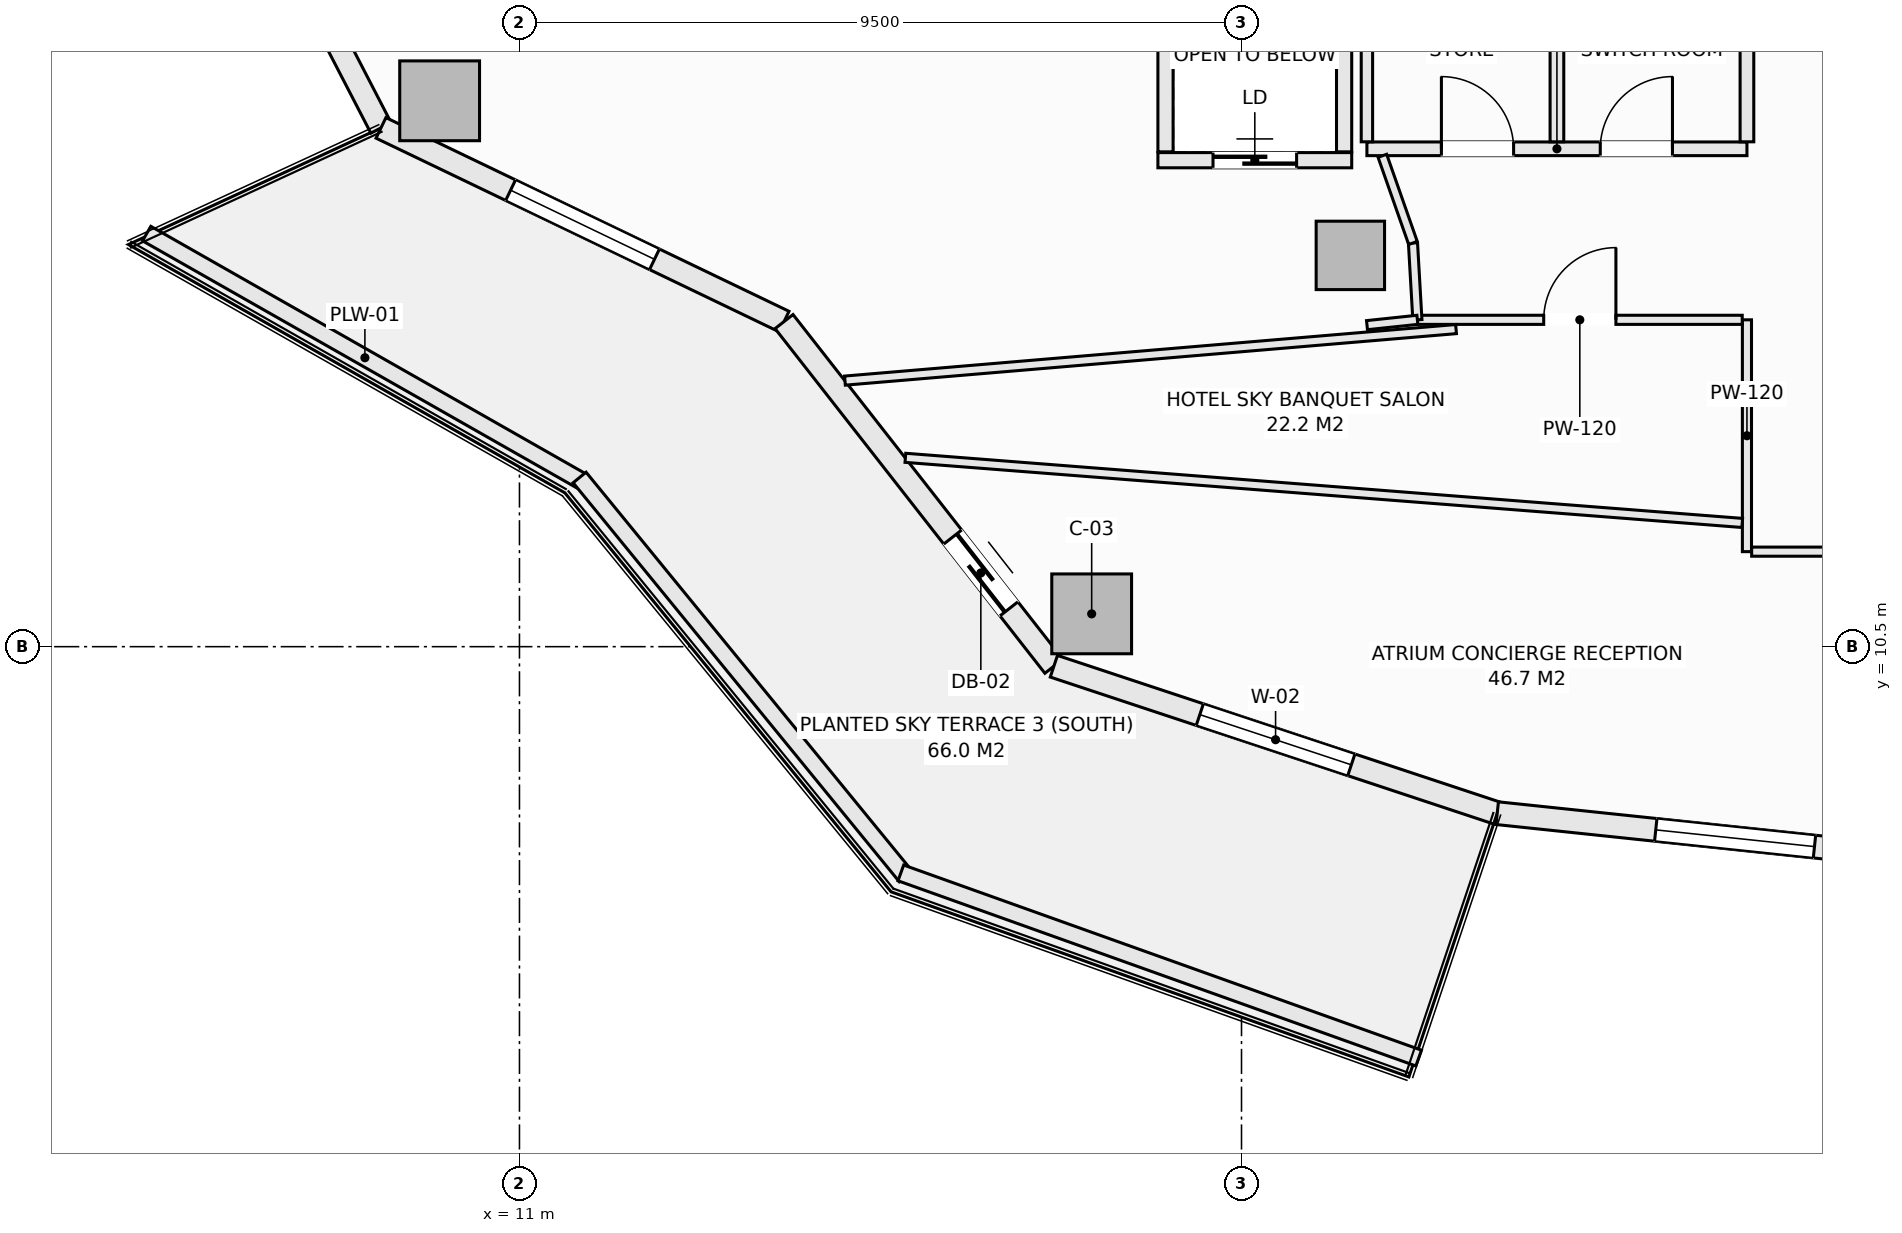
"""IFC4 building model, lengths in metres.
Left out: names, types, materials, properties, quantities, classifications, styles, units other than length and angle.
Written with IfcOpenShell. Run it as: python <this file> out.ifc"""

import sys

from ifc_helpers import new_model, si_unit, direction, frame, frame_2d, origin, origin_2d, place, context, subcontext, project, spatial, rectangle, extrude, element, fill, save


model = new_model("IFC4")
c1 = context("Model", 3, precision=1e-05, world=origin(), true_north=direction((0.0, 1.0)))
c2 = subcontext(c1, "Body", "Model", "MODEL_VIEW")
j1 = project(units=[si_unit("LENGTHUNIT", "METRE"), si_unit("PLANEANGLEUNIT", "RADIAN")], contexts=[c1])
p1 = place(None, origin())
s1 = spatial("IfcSite", under=j1, at=p1, CompositionType="ELEMENT")
p2 = place(p1, origin())
s2 = spatial("IfcBuilding", under=s1, at=p2, CompositionType="ELEMENT")
p3 = place(p2, frame((0.0, 0.0, 139.3)))
s3 = spatial("IfcBuildingStorey", under=s2, at=p3, CompositionType="ELEMENT", Elevation=139.3)
for number, where, z_axis, x_axis in (
    (1, (9.95, 17.681, -0.27), (0.0, 0.0, 1.0), (1.0, 0.0, 0.0)),
    (2, (18.529, 10.932, -0.27), (0.0, 0.0, 1.0), (1.0, 0.0, 0.0)),
):
    element("IfcColumn", number, at=place(p3, frame(where, z_axis=z_axis, x_axis=x_axis)), inside=s3, PredefinedType="COLUMN", context=c2, shape_type="SweptSolid", body=[
        extrude(rectangle(XDim=1.05, YDim=1.05, at=origin_2d()), origin(), (0.0, 0.0, 1.0), 3.4),
    ])
p4 = place(p3, frame((21.932, 15.648, -0.27), z_axis=(0.0, 0.0, 1.0), x_axis=(1.0, 0.0, 0.0)))
e3 = element("IfcColumn", 3, at=p4, inside=s3, PredefinedType="COLUMN", context=c2, shape_type="SweptSolid", body=[
    extrude(rectangle(XDim=0.9, YDim=0.9, at=origin_2d()), origin(), (0.0, 0.0, 1.0), 3.4),
])
p5 = place(p3, frame((6.762, 21.992, 0.0), z_axis=(0.0, 0.0, 1.0), x_axis=(0.459767899643, -0.888039119892, 0.0)))
e4 = element("IfcWall", 4, at=p5, inside=s3, PredefinedType="SOLIDWALL", context=c2, shape_type="SweptSolid", body=[
    extrude(rectangle(XDim=5.255, YDim=0.3, at=frame_2d((2.628, 0.0))), origin(), (0.0, 0.0, 1.0), 2.653),
])
p6 = place(p5, frame((1.578, 0.0, 0.74)))
e5 = element("IfcOpeningElement", 5, at=p6, cuts=e4, PredefinedType="OPENING", context=c2, shape_type="SweptSolid", body=[
    extrude(rectangle(XDim=2.1, YDim=1.7, at=frame_2d((1.05, 0.85))), frame((0.0, 0.16, 0.0), z_axis=(0.0, -1.0, 0.0), x_axis=(1.0, 0.0, 0.0)), (0.0, 0.0, 1.0), 0.32),
])
p7 = place(p3, frame((9.178, 17.325, 0.0), z_axis=(0.0, 0.0, 1.0), x_axis=(0.901370184739, -0.433049408339, 0.0)))
e6 = element("IfcWall", 6, at=p7, inside=s3, PredefinedType="SOLIDWALL", context=c2, shape_type="SweptSolid", body=[
    extrude(rectangle(XDim=5.884, YDim=0.3, at=frame_2d((2.942, 0.0))), origin(), (0.0, 0.0, 1.0), 2.653),
])
p8 = place(p7, frame((1.892, 0.0, 0.74)))
e7 = element("IfcOpeningElement", 7, at=p8, cuts=e6, PredefinedType="OPENING", context=c2, shape_type="SweptSolid", body=[
    extrude(rectangle(XDim=2.1, YDim=1.7, at=frame_2d((1.05, 0.85))), frame((0.0, 0.16, 0.0), z_axis=(0.0, -1.0, 0.0), x_axis=(1.0, 0.0, 0.0)), (0.0, 0.0, 1.0), 0.32),
])
p9 = place(p3, frame((14.481, 14.777, 0.0), z_axis=(0.0, 0.0, 1.0), x_axis=(0.616435134162, -0.787405693001, 0.0)))
e8 = element("IfcWall", 8, at=p9, inside=s3, PredefinedType="SOLIDWALL", context=c2, shape_type="SweptSolid", body=[
    extrude(rectangle(XDim=5.759, YDim=0.3, at=frame_2d((2.879, 0.0))), origin(), (0.0, 0.0, 1.0), 2.653),
])
p10 = place(p9, frame((3.6, 0.0, 0.0)))
e9 = element("IfcOpeningElement", 9, at=p10, cuts=e8, PredefinedType="OPENING", context=c2, shape_type="SweptSolid", body=[
    extrude(rectangle(XDim=1.2, YDim=2.2, at=frame_2d((0.6, 1.1))), frame((0.0, 0.16, 0.0), z_axis=(0.0, -1.0, 0.0), x_axis=(1.0, 0.0, 0.0)), (0.0, 0.0, 1.0), 0.32),
])
p11 = place(p3, frame((18.031, 10.242, 0.0), z_axis=(0.0, 0.0, 1.0), x_axis=(0.949238009374, -0.314558741032, 0.0)))
e10 = element("IfcWall", 10, at=p11, inside=s3, PredefinedType="SOLIDWALL", context=c2, shape_type="SweptSolid", body=[
    extrude(rectangle(XDim=6.146, YDim=0.3, at=frame_2d((3.073, 0.0))), origin(), (0.0, 0.0, 1.0), 2.653),
])
p12 = place(p11, frame((2.023, 0.0, 0.74)))
e11 = element("IfcOpeningElement", 11, at=p12, cuts=e10, PredefinedType="OPENING", context=c2, shape_type="SweptSolid", body=[
    extrude(rectangle(XDim=2.1, YDim=1.7, at=frame_2d((1.05, 0.85))), frame((0.0, 0.16, 0.0), z_axis=(0.0, -1.0, 0.0), x_axis=(1.0, 0.0, 0.0)), (0.0, 0.0, 1.0), 0.32),
])
p13 = place(p3, frame((23.865, 8.309, 0.0), z_axis=(0.0, 0.0, 1.0), x_axis=(0.994498012394, -0.104755445421, 0.0)))
e12 = element("IfcWall", 12, at=p13, inside=s3, PredefinedType="SOLIDWALL", context=c2, shape_type="SweptSolid", body=[
    extrude(rectangle(XDim=6.295, YDim=0.3, at=frame_2d((3.147, 0.0))), origin(), (0.0, 0.0, 1.0), 2.653),
])
p14 = place(p13, frame((2.097, 0.0, 0.74)))
e13 = element("IfcOpeningElement", 13, at=p14, cuts=e12, PredefinedType="OPENING", context=c2, shape_type="SweptSolid", body=[
    extrude(rectangle(XDim=2.1, YDim=1.7, at=frame_2d((1.05, 0.85))), frame((0.0, 0.16, 0.0), z_axis=(0.0, -1.0, 0.0), x_axis=(1.0, 0.0, 0.0)), (0.0, 0.0, 1.0), 0.32),
])
p15 = place(p3, frame((6.095, 15.934, 0.0), z_axis=(0.0, 0.0, 1.0), x_axis=(0.869187658335, -0.494482370361, 0.0)))
e14 = element("IfcWall", 14, at=p15, inside=s3, PredefinedType="PARAPET", context=c2, shape_type="SweptSolid", body=[
    extrude(rectangle(XDim=6.606, YDim=0.22, at=frame_2d((3.303, 0.0))), origin(), (0.0, 0.0, 1.0), 0.52),
])
p16 = place(p3, frame((11.791, 12.726, 0.0), z_axis=(0.0, 0.0, 1.0), x_axis=(0.633002467947, -0.77414977593, 0.0)))
e15 = element("IfcWall", 15, at=p16, inside=s3, PredefinedType="PARAPET", context=c2, shape_type="SweptSolid", body=[
    extrude(rectangle(XDim=6.78, YDim=0.22, at=frame_2d((3.39, 0.0))), origin(), (0.0, 0.0, 1.0), 0.52),
])
p17 = place(p3, frame((16.018, 7.523, 0.0), z_axis=(0.0, 0.0, 1.0), x_axis=(0.941632697311, -0.336642040387, 0.0)))
e16 = element("IfcWall", 16, at=p17, inside=s3, PredefinedType="PARAPET", context=c2, shape_type="SweptSolid", body=[
    extrude(rectangle(XDim=7.236, YDim=0.22, at=frame_2d((3.618, 0.0))), origin(), (0.0, 0.0, 1.0), 0.52),
])
p18 = place(p3, frame((19.4, 16.9, 0.0), z_axis=(0.0, 0.0, 1.0), x_axis=(1.0, 0.0, 0.0)))
e17 = element("IfcWall", 17, at=p18, inside=s3, PredefinedType="SOLIDWALL", context=c2, shape_type="SweptSolid", body=[
    extrude(rectangle(XDim=2.55, YDim=0.2, at=frame_2d((1.275, 0.0))), origin(), (0.0, 0.0, 1.0), 3.13),
])
p19 = place(p18, frame((0.725, 0.0, 0.0)))
e18 = element("IfcOpeningElement", 18, at=p19, cuts=e17, PredefinedType="OPENING", context=c2, shape_type="SweptSolid", body=[
    extrude(rectangle(XDim=1.1, YDim=2.2, at=frame_2d((0.55, 1.1))), frame((0.0, 0.11, 0.0), z_axis=(0.0, -1.0, 0.0), x_axis=(1.0, 0.0, 0.0)), (0.0, 0.0, 1.0), 0.22),
])
for number, where, z_axis, x_axis in (
    (19, (19.5, 17.01, 0.0), (0.0, 0.0, 1.0), (0.0, 1.0, 0.0)),
    (20, (21.85, 17.01, 0.0), (0.0, 0.0, 1.0), (0.0, 1.0, 0.0)),
):
    element("IfcWall", number, at=place(p3, frame(where, z_axis=z_axis, x_axis=x_axis)), inside=s3, PredefinedType="SOLIDWALL", context=c2, shape_type="SweptSolid", body=[
        extrude(rectangle(XDim=2.53, YDim=0.2, at=frame_2d((1.265, 0.0))), origin(), (0.0, 0.0, 1.0), 3.13),
    ])
p20 = place(p3, frame((22.15, 17.05, 0.0), z_axis=(0.0, 0.0, 1.0), x_axis=(1.0, 0.0, 0.0)))
e21 = element("IfcWall", 21, at=p20, inside=s3, PredefinedType="SOLIDWALL", context=c2, shape_type="SweptSolid", body=[
    extrude(rectangle(XDim=5.0, YDim=0.18, at=frame_2d((2.5, 0.0))), origin(), (0.0, 0.0, 1.0), 3.13),
])
p21 = place(p20, frame((0.98, 0.0, 0.0)))
e22 = element("IfcOpeningElement", 22, at=p21, cuts=e21, PredefinedType="OPENING", context=c2, shape_type="SweptSolid", body=[
    extrude(rectangle(XDim=0.95, YDim=2.1, at=frame_2d((0.475, 1.05))), frame((0.0, 0.1, 0.0), z_axis=(0.0, -1.0, 0.0), x_axis=(1.0, 0.0, 0.0)), (0.0, 0.0, 1.0), 0.2),
])
p22 = place(p20, frame((3.07, 0.0, 0.0)))
e23 = element("IfcOpeningElement", 23, at=p22, cuts=e21, PredefinedType="OPENING", context=c2, shape_type="SweptSolid", body=[
    extrude(rectangle(XDim=0.95, YDim=2.1, at=frame_2d((0.475, 1.05))), frame((0.0, 0.1, 0.0), z_axis=(0.0, -1.0, 0.0), x_axis=(1.0, 0.0, 0.0)), (0.0, 0.0, 1.0), 0.2),
])
p23 = place(p3, frame((22.15, 17.142, 0.0), z_axis=(0.0, 0.0, 1.0), x_axis=(0.0, 1.0, 0.0)))
e24 = element("IfcWall", 24, at=p23, inside=s3, PredefinedType="PARTITIONING", context=c2, shape_type="SweptSolid", body=[
    extrude(rectangle(XDim=2.706, YDim=0.15, at=frame_2d((1.353, 0.0))), origin(), (0.0, 0.0, 1.0), 3.13),
])
p24 = place(p3, frame((24.65, 17.142, 0.0), z_axis=(0.0, 0.0, 1.0), x_axis=(0.0, 1.0, 0.0)))
e25 = element("IfcWall", 25, at=p24, inside=s3, PredefinedType="SOLIDWALL", context=c2, shape_type="SweptSolid", body=[
    extrude(rectangle(XDim=2.706, YDim=0.18, at=frame_2d((1.353, 0.0))), origin(), (0.0, 0.0, 1.0), 3.13),
])
p25 = place(p3, frame((27.15, 11.75, 0.0), z_axis=(0.0, 0.0, 1.0), x_axis=(0.0, 1.0, 0.0)))
e26 = element("IfcWall", 26, at=p25, inside=s3, PredefinedType="PARTITIONING", context=c2, shape_type="SweptSolid", body=[
    extrude(rectangle(XDim=3.05, YDim=0.12, at=frame_2d((1.525, 0.0))), origin(), (0.0, 0.0, 1.0), 3.13),
])
p26 = place(p3, frame((27.15, 17.142, 0.0), z_axis=(0.0, 0.0, 1.0), x_axis=(0.0, 1.0, 0.0)))
e27 = element("IfcWall", 27, at=p26, inside=s3, PredefinedType="SOLIDWALL", context=c2, shape_type="SweptSolid", body=[
    extrude(rectangle(XDim=2.706, YDim=0.18, at=frame_2d((1.353, 0.0))), origin(), (0.0, 0.0, 1.0), 3.13),
])
p27 = place(p3, frame((27.212, 11.75, 0.0), z_axis=(0.0, 0.0, 1.0), x_axis=(1.0, 0.0, 0.0)))
e28 = element("IfcWall", 28, at=p27, inside=s3, PredefinedType="PARTITIONING", context=c2, shape_type="SweptSolid", body=[
    extrude(rectangle(XDim=8.676, YDim=0.12, at=frame_2d((4.338, 0.0))), origin(), (0.0, 0.0, 1.0), 3.13),
])
p28 = place(p27, frame((1.105, 0.0, 0.0)))
e29 = element("IfcOpeningElement", 29, at=p28, cuts=e28, PredefinedType="OPENING", context=c2, shape_type="SweptSolid", body=[
    extrude(rectangle(XDim=0.95, YDim=2.1, at=frame_2d((0.475, 1.05))), frame((0.0, 0.07, 0.0), z_axis=(0.0, -1.0, 0.0), x_axis=(1.0, 0.0, 0.0)), (0.0, 0.0, 1.0), 0.14),
])
p29 = place(p27, frame((4.698, 0.0, 0.0)))
e30 = element("IfcOpeningElement", 30, at=p29, cuts=e28, PredefinedType="OPENING", context=c2, shape_type="SweptSolid", body=[
    extrude(rectangle(XDim=0.95, YDim=2.1, at=frame_2d((0.475, 1.05))), frame((0.0, 0.07, 0.0), z_axis=(0.0, -1.0, 0.0), x_axis=(1.0, 0.0, 0.0)), (0.0, 0.0, 1.0), 0.14),
])
p30 = place(p3, frame((22.814, 14.8, 0.0), z_axis=(0.0, 0.0, 1.0), x_axis=(1.0, 0.0, 0.0)))
e31 = element("IfcWall", 31, at=p30, inside=s3, PredefinedType="PARTITIONING", context=c2, shape_type="SweptSolid", body=[
    extrude(rectangle(XDim=4.274, YDim=0.12, at=frame_2d((2.137, 0.0))), origin(), (0.0, 0.0, 1.0), 3.13),
])
p31 = place(p30, frame((1.662, 0.0, 0.0)))
e32 = element("IfcOpeningElement", 32, at=p31, cuts=e31, PredefinedType="OPENING", context=c2, shape_type="SweptSolid", body=[
    extrude(rectangle(XDim=0.95, YDim=2.1, at=frame_2d((0.475, 1.05))), frame((0.0, 0.07, 0.0), z_axis=(0.0, -1.0, 0.0), x_axis=(1.0, 0.0, 0.0)), (0.0, 0.0, 1.0), 0.14),
])
p32 = place(p3, frame((22.756, 15.811, 0.0), z_axis=(0.0, 0.0, 1.0), x_axis=(0.057139047697, -0.998366230012, 0.0)))
e33 = element("IfcWall", 33, at=p32, inside=s3, PredefinedType="PARTITIONING", context=c2, shape_type="SweptSolid", body=[
    extrude(rectangle(XDim=1.013, YDim=0.12, at=frame_2d((0.506, 0.0))), origin(), (0.0, 0.0, 1.0), 3.13),
])
p33 = place(p3, frame((22.353, 16.958, 0.0), z_axis=(0.0, 0.0, 1.0), x_axis=(0.331370038458, -0.943500873138, 0.0)))
e34 = element("IfcWall", 34, at=p33, inside=s3, PredefinedType="PARTITIONING", context=c2, shape_type="SweptSolid", body=[
    extrude(rectangle(XDim=1.216, YDim=0.12, at=frame_2d((0.608, 0.0))), origin(), (0.0, 0.0, 1.0), 3.13),
])
p34 = place(p3, frame((15.282, 14.0, 0.0), z_axis=(0.0, 0.0, 1.0), x_axis=(0.996466219822, 0.083994480498, 0.0)))
e35 = element("IfcWall", 35, at=p34, inside=s3, PredefinedType="PARTITIONING", context=c2, shape_type="SweptSolid", body=[
    extrude(rectangle(XDim=8.069, YDim=0.12, at=frame_2d((4.034, 0.0))), origin(), (0.0, 0.0, 1.0), 3.13),
])
p35 = place(p3, frame((16.078, 12.985, 0.0), z_axis=(0.0, 0.0, 1.0), x_axis=(0.996984897733, -0.077595835537, 0.0)))
e36 = element("IfcWall", 36, at=p35, inside=s3, PredefinedType="PARTITIONING", context=c2, shape_type="SweptSolid", body=[
    extrude(rectangle(XDim=11.043, YDim=0.12, at=frame_2d((5.522, 0.0))), origin(), (0.0, 0.0, 1.0), 2.653),
])
p36 = place(p3, frame((22.151, 14.73, 0.0), z_axis=(0.0, 0.0, 1.0), x_axis=(0.994424911767, 0.105447118774, 0.0)))
e37 = element("IfcWall", 37, at=p36, inside=s3, PredefinedType="PARTITIONING", context=c2, shape_type="SweptSolid", body=[
    extrude(rectangle(XDim=0.667, YDim=0.12, at=frame_2d((0.333, 0.0))), origin(), (0.0, 0.0, 1.0), 3.13),
])
p37 = place(p8, origin())
e38 = element("IfcWindow", 38, at=p37, inside=s3, PartitioningType="SINGLE_PANEL", PredefinedType="WINDOW", context=c2, shape_type="SweptSolid", body=[
    extrude(rectangle(XDim=2.1, YDim=1.7, at=frame_2d((1.05, 0.85))), frame((0.0, 0.03, 0.0), z_axis=(0.0, -1.0, 0.0), x_axis=(1.0, 0.0, 0.0)), (0.0, 0.0, 1.0), 0.06),
])
fill(e7, e38)
p38 = place(p10, frame((1.2, 0.0, 0.0), z_axis=(0.0, 0.0, 1.0), x_axis=(-1.0, 0.0, 0.0)))
e39 = element("IfcDoor", 39, at=p38, inside=s3, OperationType="SLIDING_TO_LEFT", PredefinedType="DOOR", context=c2, shape_type="SweptSolid", body=[
    extrude(rectangle(XDim=1.2, YDim=2.2, at=frame_2d((0.6, 1.1))), frame((0.0, 0.025, 0.0), z_axis=(0.0, -1.0, 0.0), x_axis=(1.0, 0.0, 0.0)), (0.0, 0.0, 1.0), 0.05),
])
fill(e9, e39)
p39 = place(p12, origin())
e40 = element("IfcWindow", 40, at=p39, inside=s3, PartitioningType="SINGLE_PANEL", PredefinedType="WINDOW", context=c2, shape_type="SweptSolid", body=[
    extrude(rectangle(XDim=2.1, YDim=1.7, at=frame_2d((1.05, 0.85))), frame((0.0, 0.03, 0.0), z_axis=(0.0, -1.0, 0.0), x_axis=(1.0, 0.0, 0.0)), (0.0, 0.0, 1.0), 0.06),
])
fill(e11, e40)
p40 = place(p14, origin())
e41 = element("IfcWindow", 41, at=p40, inside=s3, PartitioningType="SINGLE_PANEL", PredefinedType="WINDOW", context=c2, shape_type="SweptSolid", body=[
    extrude(rectangle(XDim=2.1, YDim=1.7, at=frame_2d((1.05, 0.85))), frame((0.0, 0.03, 0.0), z_axis=(0.0, -1.0, 0.0), x_axis=(1.0, 0.0, 0.0)), (0.0, 0.0, 1.0), 0.06),
])
fill(e13, e41)
p41 = place(p19, origin())
e42 = element("IfcDoor", 42, at=p41, inside=s3, OperationType="SLIDING_TO_LEFT", PredefinedType="DOOR", context=c2, shape_type="SweptSolid", body=[
    extrude(rectangle(XDim=1.1, YDim=2.2, at=frame_2d((0.55, 1.1))), frame((0.0, 0.025, 0.0), z_axis=(0.0, -1.0, 0.0), x_axis=(1.0, 0.0, 0.0)), (0.0, 0.0, 1.0), 0.05),
])
fill(e18, e42)
p42 = place(p21, origin())
e43 = element("IfcDoor", 43, at=p42, inside=s3, OperationType="SINGLE_SWING_LEFT", PredefinedType="DOOR", context=c2, shape_type="SweptSolid", body=[
    extrude(rectangle(XDim=0.95, YDim=2.1, at=frame_2d((0.475, 1.05))), frame((0.0, 0.025, 0.0), z_axis=(0.0, -1.0, 0.0), x_axis=(1.0, 0.0, 0.0)), (0.0, 0.0, 1.0), 0.05),
])
fill(e22, e43)
p43 = place(p22, origin())
e44 = element("IfcDoor", 44, at=p43, inside=s3, OperationType="SINGLE_SWING_RIGHT", PredefinedType="DOOR", context=c2, shape_type="SweptSolid", body=[
    extrude(rectangle(XDim=0.95, YDim=2.1, at=frame_2d((0.475, 1.05))), frame((0.0, 0.025, 0.0), z_axis=(0.0, -1.0, 0.0), x_axis=(1.0, 0.0, 0.0)), (0.0, 0.0, 1.0), 0.05),
])
fill(e23, e44)
p44 = place(p31, origin())
e45 = element("IfcDoor", 45, at=p44, inside=s3, OperationType="SINGLE_SWING_RIGHT", PredefinedType="DOOR", context=c2, shape_type="SweptSolid", body=[
    extrude(rectangle(XDim=0.95, YDim=2.1, at=frame_2d((0.475, 1.05))), frame((0.0, 0.025, 0.0), z_axis=(0.0, -1.0, 0.0), x_axis=(1.0, 0.0, 0.0)), (0.0, 0.0, 1.0), 0.05),
])
fill(e32, e45)
save(model, sys.argv[1])
